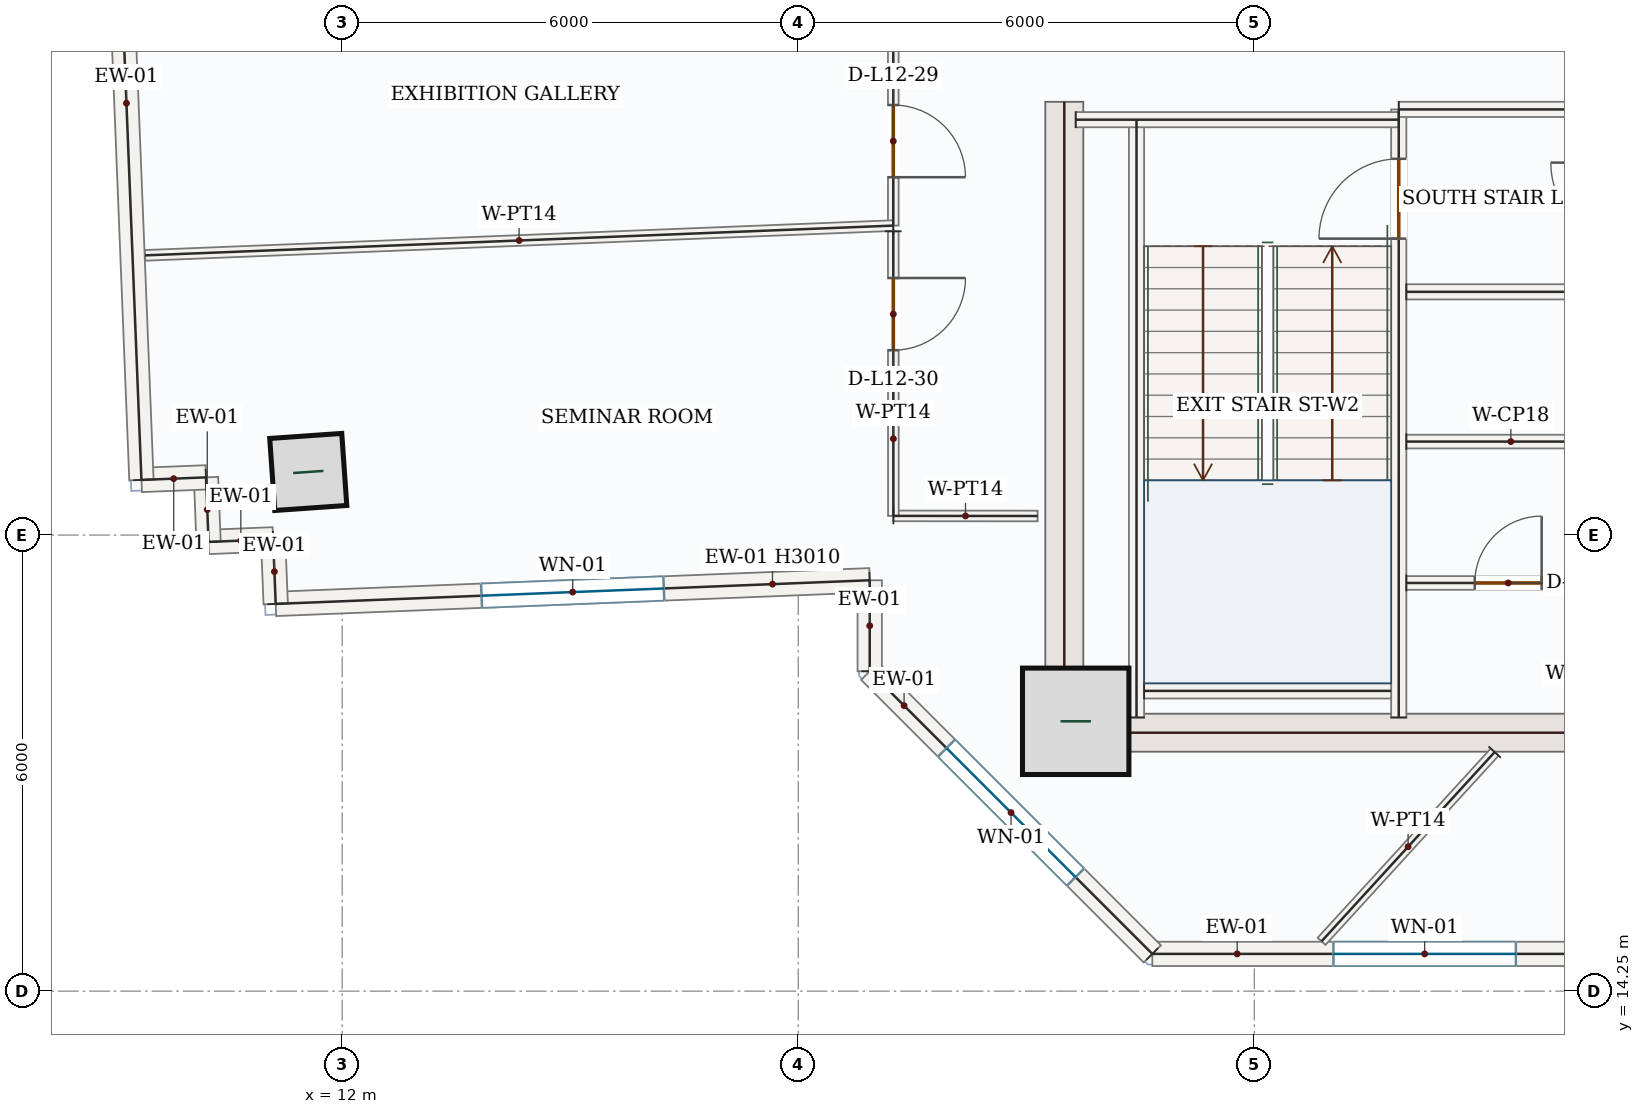
"""IFC4 building model, lengths in metres.
Left out: names, types, materials, properties, quantities, classifications, styles, units other than length and angle.
Written with IfcOpenShell. Run it as: python <this file> out.ifc"""

import sys

from ifc_helpers import new_model, si_unit, direction, frame, frame_2d, origin, origin_2d, place, context, subcontext, project, spatial, rectangle, hollow_rectangle, extrude, source, transform, mapped, element, fill, save


model = new_model("IFC4")
c1 = context("Model", 3, precision=1e-05, world=origin(), true_north=direction((0.0, 1.0)))
c2 = subcontext(c1, "Body", "Model", "MODEL_VIEW")
j1 = project(units=[si_unit("LENGTHUNIT", "METRE"), si_unit("PLANEANGLEUNIT", "RADIAN")], contexts=[c1])
p1 = place(None, origin())
s1 = spatial("IfcSite", under=j1, at=p1, CompositionType="ELEMENT")
p2 = place(p1, origin())
s2 = spatial("IfcBuilding", under=s1, at=p2, CompositionType="ELEMENT")
p3 = place(p2, frame((0.0, 0.0, 58.5)))
s3 = spatial("IfcBuildingStorey", under=s2, at=p3, CompositionType="ELEMENT", Elevation=58.5)
m1 = source(origin(), c2, "Body", "SweptSolid", [
    extrude(rectangle(XDim=8.55, YDim=0.5, at=frame_2d((4.275, 0.0))), origin(), (0.0, 0.0, 1.0), 3.95),
])
p4 = place(p3, frame((21.5, 17.4, 0.0), z_axis=(0.0, 0.0, 1.0), x_axis=(0.0, 1.0, 0.0)))
e1 = element("IfcWall", 1, at=p4, inside=s3, PredefinedType="SHEAR", context=c2, shape_type="MappedRepresentation", body=[
    mapped(m1, transform((0.0, 0.0, 0.0), x_axis=(1.0, 0.0, 0.0), y_axis=(0.0, 1.0, 0.0), z_axis=(0.0, 0.0, 1.0), scale=1.0)),
])
m2 = source(origin(), c2, "Body", "SweptSolid", [
    extrude(rectangle(XDim=7.0, YDim=0.5, at=frame_2d((3.5, 0.0))), origin(), (0.0, 0.0, 1.0), 3.95),
])
p5 = place(p3, frame((21.75, 17.65, 0.0), z_axis=(0.0, 0.0, 1.0), x_axis=(1.0, 0.0, 0.0)))
e2 = element("IfcWall", 2, at=p5, inside=s3, PredefinedType="SHEAR", context=c2, shape_type="MappedRepresentation", body=[
    mapped(m2, transform((0.0, 0.0, 0.0), x_axis=(1.0, 0.0, 0.0), y_axis=(0.0, 1.0, 0.0), z_axis=(0.0, 0.0, 1.0), scale=1.0)),
])
m3 = source(origin(), c2, "Body", "SweptSolid", [
    extrude(rectangle(XDim=1.4, YDim=1.4, at=origin_2d()), origin(), (0.0, 0.0, 1.0), 4.2),
])
p6 = place(p3, frame((21.65, 17.8, 0.0), z_axis=(0.0, 0.0, 1.0), x_axis=(1.0, 0.0, 0.0)))
e3 = element("IfcColumn", 3, at=p6, inside=s3, PredefinedType="COLUMN", context=c2, shape_type="MappedRepresentation", body=[
    mapped(m3, transform((0.0, 0.0, 0.0), x_axis=(1.0, 0.0, 0.0), y_axis=(0.0, 1.0, 0.0), z_axis=(0.0, 0.0, 1.0), scale=1.0)),
])
m4 = source(origin(), c2, "Body", "SweptSolid", [
    extrude(hollow_rectangle(XDim=0.95, YDim=0.95, WallThickness=0.05, at=origin_2d()), origin(), (0.0, 0.0, 1.0), 4.2),
])
p7 = place(p3, frame((11.553, 21.08, 0.0), z_axis=(0.0, 0.0, 1.0), x_axis=(0.99756405026, 0.069756473744, 0.0)))
e4 = element("IfcColumn", 4, at=p7, inside=s3, PredefinedType="COLUMN", context=c2, shape_type="MappedRepresentation", body=[
    mapped(m4, transform((0.0, 0.0, 0.0), x_axis=(1.0, 0.0, 0.0), y_axis=(0.0, 1.0, 0.0), z_axis=(0.0, 0.0, 1.0), scale=1.0)),
])
p8 = place(p3, frame((29.823, 14.74, 0.0), z_axis=(0.0, 0.0, 1.0), x_axis=(-1.0, 0.0, 0.0)))
e5 = element("IfcWall", 5, at=p8, inside=s3, PredefinedType="SOLIDWALL", context=c2, shape_type="SweptSolid", body=[
    extrude(rectangle(XDim=7.165, YDim=0.32, at=frame_2d((3.583, 0.0))), origin(), (0.0, 0.0, 1.0), 3.95),
])
p9 = place(p8, frame((2.382, 0.0, 0.85)))
e6 = element("IfcOpeningElement", 6, at=p9, cuts=e5, PredefinedType="OPENING", context=c2, shape_type="SweptSolid", body=[
    extrude(rectangle(XDim=2.4, YDim=1.8, at=frame_2d((1.2, 0.9))), frame((0.0, 0.17, 0.0), z_axis=(0.0, -1.0, 0.0), x_axis=(1.0, 0.0, 0.0)), (0.0, 0.0, 1.0), 0.34),
])
p10 = place(p3, frame((22.658, 14.74, 0.0), z_axis=(0.0, 0.0, 1.0), x_axis=(-0.707106781187, 0.707106781187, 0.0)))
e7 = element("IfcWall", 7, at=p10, inside=s3, PredefinedType="SOLIDWALL", context=c2, shape_type="SweptSolid", body=[
    extrude(rectangle(XDim=5.258, YDim=0.32, at=frame_2d((2.629, 0.0))), origin(), (0.0, 0.0, 1.0), 3.95),
])
p11 = place(p10, frame((1.429, 0.0, 0.85)))
e8 = element("IfcOpeningElement", 8, at=p11, cuts=e7, PredefinedType="OPENING", context=c2, shape_type="SweptSolid", body=[
    extrude(rectangle(XDim=2.4, YDim=1.8, at=frame_2d((1.2, 0.9))), frame((0.0, 0.17, 0.0), z_axis=(0.0, -1.0, 0.0), x_axis=(1.0, 0.0, 0.0)), (0.0, 0.0, 1.0), 0.34),
])
m5 = source(origin(), c2, "Body", "SweptSolid", [
    extrude(rectangle(XDim=1.198, YDim=0.32, at=frame_2d((0.599, 0.0))), origin(), (0.0, 0.0, 1.0), 3.95),
])
p12 = place(p3, frame((18.94, 18.458, 0.0), z_axis=(0.0, 0.0, 1.0), x_axis=(0.0, 1.0, 0.0)))
e9 = element("IfcWall", 9, at=p12, inside=s3, PredefinedType="SOLIDWALL", context=c2, shape_type="MappedRepresentation", body=[
    mapped(m5, transform((0.0, 0.0, 0.0), x_axis=(1.0, 0.0, 0.0), y_axis=(0.0, 1.0, 0.0), z_axis=(0.0, 0.0, 1.0), scale=1.0)),
])
p13 = place(p3, frame((18.94, 19.656, 0.0), z_axis=(0.0, 0.0, 1.0), x_axis=(-0.999208917222, -0.039768577336, 0.0)))
e10 = element("IfcWall", 10, at=p13, inside=s3, PredefinedType="SOLIDWALL", context=c2, shape_type="SweptSolid", body=[
    extrude(rectangle(XDim=7.821, YDim=0.32, at=frame_2d((3.911, 0.0))), origin(), (0.0, 0.0, 1.0), 3.01),
])
p14 = place(p13, frame((2.711, 0.0, 0.85)))
e11 = element("IfcOpeningElement", 11, at=p14, cuts=e10, PredefinedType="OPENING", context=c2, shape_type="SweptSolid", body=[
    extrude(rectangle(XDim=2.4, YDim=1.8, at=frame_2d((1.2, 0.9))), frame((0.0, 0.17, 0.0), z_axis=(0.0, -1.0, 0.0), x_axis=(1.0, 0.0, 0.0)), (0.0, 0.0, 1.0), 0.34),
])
m6 = source(origin(), c2, "Body", "SweptSolid", [
    extrude(rectangle(XDim=0.85, YDim=0.32, at=frame_2d((0.425, 0.0))), origin(), (0.0, 0.0, 1.0), 3.95),
])
p15 = place(p3, frame((11.125, 19.344, 0.0), z_axis=(0.0, 0.0, 1.0), x_axis=(-0.039933618331, 0.999202334929, 0.0)))
e12 = element("IfcWall", 12, at=p15, inside=s3, PredefinedType="SOLIDWALL", context=c2, shape_type="MappedRepresentation", body=[
    mapped(m6, transform((0.0, 0.0, 0.0), x_axis=(1.0, 0.0, 0.0), y_axis=(0.0, 1.0, 0.0), z_axis=(0.0, 0.0, 1.0), scale=1.0)),
])
m7 = source(origin(), c2, "Body", "SweptSolid", [
    extrude(rectangle(XDim=0.85, YDim=0.32, at=frame_2d((0.425, 0.0))), origin(), (0.0, 0.0, 1.0), 3.95),
])
for number, where, z_axis, x_axis in (
    (13, (11.091, 20.194, 0.0), (0.0, 0.0, 1.0), (-0.999, -0.04, 0.0)),
    (14, (10.242, 20.16, 0.0), (0.0, 0.0, 1.0), (-0.04, 0.999, 0.0)),
    (15, (10.208, 21.009, 0.0), (0.0, 0.0, 1.0), (-0.999, -0.04, 0.0)),
):
    element("IfcWall", number, at=place(p3, frame(where, z_axis=z_axis, x_axis=x_axis)), inside=s3, PredefinedType="SOLIDWALL", context=c2, shape_type="MappedRepresentation", body=[
        mapped(m7, transform((0.0, 0.0, 0.0), x_axis=(1.0, 0.0, 0.0), y_axis=(0.0, 1.0, 0.0), z_axis=(0.0, 0.0, 1.0), scale=1.0)),
    ])
m8 = source(origin(), c2, "Body", "SweptSolid", [
    extrude(rectangle(XDim=9.92, YDim=0.32, at=frame_2d((4.96, 0.0))), origin(), (0.0, 0.0, 1.0), 3.95),
])
p16 = place(p3, frame((9.359, 20.975, 0.0), z_axis=(0.0, 0.0, 1.0), x_axis=(-0.03977146366, 0.999208802342, 0.0)))
e16 = element("IfcWall", 16, at=p16, inside=s3, PredefinedType="SOLIDWALL", context=c2, shape_type="MappedRepresentation", body=[
    mapped(m8, transform((0.0, 0.0, 0.0), x_axis=(1.0, 0.0, 0.0), y_axis=(0.0, 1.0, 0.0), z_axis=(0.0, 0.0, 1.0), scale=1.0)),
])
m9 = source(origin(), c2, "Body", "SweptSolid", [
    extrude(rectangle(XDim=7.87, YDim=0.2, at=frame_2d((3.935, 0.0))), origin(), (0.0, 0.0, 1.0), 3.95),
])
p17 = place(p3, frame((22.45, 17.85, 0.0), z_axis=(0.0, 0.0, 1.0), x_axis=(0.0, 1.0, 0.0)))
e17 = element("IfcWall", 17, at=p17, inside=s3, PredefinedType="SOLIDWALL", context=c2, shape_type="MappedRepresentation", body=[
    mapped(m9, transform((0.0, 0.0, 0.0), x_axis=(1.0, 0.0, 0.0), y_axis=(0.0, 1.0, 0.0), z_axis=(0.0, 0.0, 1.0), scale=1.0)),
])
p18 = place(p3, frame((25.9, 17.85, 0.0), z_axis=(0.0, 0.0, 1.0), x_axis=(0.0, 1.0, 0.0)))
e18 = element("IfcWall", 18, at=p18, inside=s3, PredefinedType="SOLIDWALL", context=c2, shape_type="SweptSolid", body=[
    extrude(rectangle(XDim=8.0, YDim=0.2, at=frame_2d((4.0, 0.0))), origin(), (0.0, 0.0, 1.0), 3.95),
])
p19 = place(p18, frame((6.3, 0.0, 0.0)))
e19 = element("IfcOpeningElement", 19, at=p19, cuts=e18, PredefinedType="OPENING", context=c2, shape_type="SweptSolid", body=[
    extrude(rectangle(XDim=1.05, YDim=2.15, at=frame_2d((0.525, 1.075))), frame((0.0, 0.11, 0.0), z_axis=(0.0, -1.0, 0.0), x_axis=(1.0, 0.0, 0.0)), (0.0, 0.0, 1.0), 0.22),
])
m10 = source(origin(), c2, "Body", "SweptSolid", [
    extrude(rectangle(XDim=4.25, YDim=0.2, at=frame_2d((2.125, 0.0))), origin(), (0.0, 0.0, 1.0), 3.95),
])
p20 = place(p3, frame((21.65, 25.715, 0.0), z_axis=(0.0, 0.0, 1.0), x_axis=(1.0, 0.0, 0.0)))
e20 = element("IfcWall", 20, at=p20, inside=s3, PredefinedType="SOLIDWALL", context=c2, shape_type="MappedRepresentation", body=[
    mapped(m10, transform((0.0, 0.0, 0.0), x_axis=(1.0, 0.0, 0.0), y_axis=(0.0, 1.0, 0.0), z_axis=(0.0, 0.0, 1.0), scale=1.0)),
])
m11 = source(origin(), c2, "Body", "SweptSolid", [
    extrude(rectangle(XDim=3.0, YDim=0.2, at=frame_2d((1.5, 0.0))), origin(), (0.0, 0.0, 1.0), 3.95),
])
p21 = place(p3, frame((25.9, 25.85, 0.0), z_axis=(0.0, 0.0, 1.0), x_axis=(1.0, 0.0, 0.0)))
e21 = element("IfcWall", 21, at=p21, inside=s3, PredefinedType="SOLIDWALL", context=c2, shape_type="MappedRepresentation", body=[
    mapped(m11, transform((0.0, 0.0, 0.0), x_axis=(1.0, 0.0, 0.0), y_axis=(0.0, 1.0, 0.0), z_axis=(0.0, 0.0, 1.0), scale=1.0)),
])
m12 = source(origin(), c2, "Body", "SweptSolid", [
    extrude(rectangle(XDim=3.25, YDim=0.2, at=frame_2d((1.625, 0.0))), origin(), (0.0, 0.0, 1.0), 3.95),
])
p22 = place(p3, frame((22.55, 18.2, 0.0), z_axis=(0.0, 0.0, 1.0), x_axis=(1.0, 0.0, 0.0)))
e22 = element("IfcWall", 22, at=p22, inside=s3, PredefinedType="SOLIDWALL", context=c2, shape_type="MappedRepresentation", body=[
    mapped(m12, transform((0.0, 0.0, 0.0), x_axis=(1.0, 0.0, 0.0), y_axis=(0.0, 1.0, 0.0), z_axis=(0.0, 0.0, 1.0), scale=1.0)),
])
m13 = source(origin(), c2, "Body", "SweptSolid", [
    extrude(rectangle(XDim=2.75, YDim=0.2, at=frame_2d((1.375, 0.0))), origin(), (0.0, 0.0, 1.0), 3.95),
])
p23 = place(p3, frame((26.0, 23.45, 0.0), z_axis=(0.0, 0.0, 1.0), x_axis=(1.0, 0.0, 0.0)))
e23 = element("IfcWall", 23, at=p23, inside=s3, PredefinedType="SOLIDWALL", context=c2, shape_type="MappedRepresentation", body=[
    mapped(m13, transform((0.0, 0.0, 0.0), x_axis=(1.0, 0.0, 0.0), y_axis=(0.0, 1.0, 0.0), z_axis=(0.0, 0.0, 1.0), scale=1.0)),
])
p24 = place(p3, frame((26.0, 19.62, 0.0), z_axis=(0.0, 0.0, 1.0), x_axis=(1.0, 0.0, 0.0)))
e24 = element("IfcWall", 24, at=p24, inside=s3, PredefinedType="PARTITIONING", context=c2, shape_type="SweptSolid", body=[
    extrude(rectangle(XDim=2.75, YDim=0.18, at=frame_2d((1.375, 0.0))), origin(), (0.0, 0.0, 1.0), 3.95),
])
p25 = place(p24, frame((0.9, 0.0, 0.0)))
e25 = element("IfcOpeningElement", 25, at=p25, cuts=e24, PredefinedType="OPENING", context=c2, shape_type="SweptSolid", body=[
    extrude(rectangle(XDim=0.88, YDim=2.1, at=frame_2d((0.44, 1.05))), frame((0.0, 0.1, 0.0), z_axis=(0.0, -1.0, 0.0), x_axis=(1.0, 0.0, 0.0)), (0.0, 0.0, 1.0), 0.2),
])
m14 = source(origin(), c2, "Body", "SweptSolid", [
    extrude(rectangle(XDim=2.75, YDim=0.18, at=frame_2d((1.375, 0.0))), origin(), (0.0, 0.0, 1.0), 3.95),
])
p26 = place(p3, frame((26.0, 21.48, 0.0), z_axis=(0.0, 0.0, 1.0), x_axis=(1.0, 0.0, 0.0)))
e26 = element("IfcWall", 26, at=p26, inside=s3, PredefinedType="PARTITIONING", context=c2, shape_type="MappedRepresentation", body=[
    mapped(m14, transform((0.0, 0.0, 0.0), x_axis=(1.0, 0.0, 0.0), y_axis=(0.0, 1.0, 0.0), z_axis=(0.0, 0.0, 1.0), scale=1.0)),
])
p27 = place(p3, frame((19.25, 28.165, 0.0), z_axis=(0.0, 0.0, 1.0), x_axis=(0.0, -1.0, 0.0)))
e27 = element("IfcWall", 27, at=p27, inside=s3, PredefinedType="PARTITIONING", context=c2, shape_type="SweptSolid", body=[
    extrude(rectangle(XDim=3.843, YDim=0.14, at=frame_2d((1.921, 0.0))), origin(), (0.0, 0.0, 1.0), 3.95),
])
p28 = place(p27, frame((2.257, 0.0, 0.0)))
e28 = element("IfcOpeningElement", 28, at=p28, cuts=e27, PredefinedType="OPENING", context=c2, shape_type="SweptSolid", body=[
    extrude(rectangle(XDim=0.95, YDim=2.15, at=frame_2d((0.475, 1.075))), frame((0.0, 0.08, 0.0), z_axis=(0.0, -1.0, 0.0), x_axis=(1.0, 0.0, 0.0)), (0.0, 0.0, 1.0), 0.16),
])
m15 = source(origin(), c2, "Body", "SweptSolid", [
    extrude(rectangle(XDim=9.851, YDim=0.14, at=frame_2d((4.925, 0.0))), origin(), (0.0, 0.0, 1.0), 3.95),
])
p29 = place(p3, frame((19.249, 24.322, 0.0), z_axis=(0.0, 0.0, 1.0), x_axis=(-0.999208542072, -0.039778002084, 0.0)))
e29 = element("IfcWall", 29, at=p29, inside=s3, PredefinedType="PARTITIONING", context=c2, shape_type="MappedRepresentation", body=[
    mapped(m15, transform((0.0, 0.0, 0.0), x_axis=(1.0, 0.0, 0.0), y_axis=(0.0, 1.0, 0.0), z_axis=(0.0, 0.0, 1.0), scale=1.0)),
])
m16 = source(origin(), c2, "Body", "SweptSolid", [
    extrude(rectangle(XDim=1.898, YDim=0.14, at=frame_2d((0.949, 0.0))), origin(), (0.0, 0.0, 1.0), 3.95),
])
p30 = place(p3, frame((19.251, 20.502, 0.0), z_axis=(0.0, 0.0, 1.0), x_axis=(0.999999793113, -0.00064325215, 0.0)))
e30 = element("IfcWall", 30, at=p30, inside=s3, PredefinedType="PARTITIONING", context=c2, shape_type="MappedRepresentation", body=[
    mapped(m16, transform((0.0, 0.0, 0.0), x_axis=(1.0, 0.0, 0.0), y_axis=(0.0, 1.0, 0.0), z_axis=(0.0, 0.0, 1.0), scale=1.0)),
])
m17 = source(origin(), c2, "Body", "SweptSolid", [
    extrude(rectangle(XDim=3.375, YDim=0.14, at=frame_2d((1.688, 0.0))), origin(), (0.0, 0.0, 1.0), 3.95),
])
p31 = place(p3, frame((27.162, 17.395, 0.0), z_axis=(0.0, 0.0, 1.0), x_axis=(-0.674974079893, -0.737841440604, 0.0)))
e31 = element("IfcWall", 31, at=p31, inside=s3, PredefinedType="PARTITIONING", context=c2, shape_type="MappedRepresentation", body=[
    mapped(m17, transform((0.0, 0.0, 0.0), x_axis=(1.0, 0.0, 0.0), y_axis=(0.0, 1.0, 0.0), z_axis=(0.0, 0.0, 1.0), scale=1.0)),
])
p32 = place(p3, frame((19.25, 24.247, 0.0), z_axis=(0.0, 0.0, 1.0), x_axis=(0.000326008981, -0.999999946859, 0.0)))
e32 = element("IfcWall", 32, at=p32, inside=s3, PredefinedType="PARTITIONING", context=c2, shape_type="SweptSolid", body=[
    extrude(rectangle(XDim=3.744, YDim=0.14, at=frame_2d((1.872, 0.0))), origin(), (0.0, 0.0, 1.0), 3.95),
])
p33 = place(p32, frame((0.615, 0.0, 0.0)))
e33 = element("IfcOpeningElement", 33, at=p33, cuts=e32, PredefinedType="OPENING", context=c2, shape_type="SweptSolid", body=[
    extrude(rectangle(XDim=0.95, YDim=2.15, at=frame_2d((0.475, 1.075))), frame((0.0, 0.08, 0.0), z_axis=(0.0, -1.0, 0.0), x_axis=(1.0, 0.0, 0.0)), (0.0, 0.0, 1.0), 0.16),
])
m18 = source(origin(), c2, "Body", "SweptSolid", [
    extrude(rectangle(XDim=2.4, YDim=1.8, at=frame_2d((1.2, 0.9))), frame((0.0, 0.03, 0.0), z_axis=(0.0, -1.0, 0.0), x_axis=(1.0, 0.0, 0.0)), (0.0, 0.0, 1.0), 0.06),
])
p34 = place(p9, origin())
e34 = element("IfcWindow", 34, at=p34, inside=s3, PartitioningType="DOUBLE_PANEL_VERTICAL", PredefinedType="WINDOW", context=c2, shape_type="MappedRepresentation", body=[
    mapped(m18, transform((0.0, 0.0, 0.0), x_axis=(1.0, 0.0, 0.0), y_axis=(0.0, 1.0, 0.0), z_axis=(0.0, 0.0, 1.0), scale=1.0)),
])
fill(e6, e34)
p35 = place(p11, origin())
e35 = element("IfcWindow", 35, at=p35, inside=s3, PartitioningType="DOUBLE_PANEL_VERTICAL", PredefinedType="WINDOW", context=c2, shape_type="MappedRepresentation", body=[
    mapped(m18, transform((0.0, 0.0, 0.0), x_axis=(1.0, 0.0, 0.0), y_axis=(0.0, 1.0, 0.0), z_axis=(0.0, 0.0, 1.0), scale=1.0)),
])
fill(e8, e35)
p36 = place(p14, origin())
e36 = element("IfcWindow", 36, at=p36, inside=s3, PartitioningType="DOUBLE_PANEL_VERTICAL", PredefinedType="WINDOW", context=c2, shape_type="MappedRepresentation", body=[
    mapped(m18, transform((0.0, 0.0, 0.0), x_axis=(1.0, 0.0, 0.0), y_axis=(0.0, 1.0, 0.0), z_axis=(0.0, 0.0, 1.0), scale=1.0)),
])
fill(e11, e36)
m19 = source(origin(), c2, "Body", "SweptSolid", [
    extrude(rectangle(XDim=1.05, YDim=2.15, at=frame_2d((0.525, 1.075))), frame((0.0, 0.025, 0.0), z_axis=(0.0, -1.0, 0.0), x_axis=(1.0, 0.0, 0.0)), (0.0, 0.0, 1.0), 0.05),
])
p37 = place(p19, origin())
e37 = element("IfcDoor", 37, at=p37, inside=s3, OperationType="SINGLE_SWING_LEFT", PredefinedType="DOOR", context=c2, shape_type="MappedRepresentation", body=[
    mapped(m19, transform((0.0, 0.0, 0.0), x_axis=(1.0, 0.0, 0.0), y_axis=(0.0, 1.0, 0.0), z_axis=(0.0, 0.0, 1.0), scale=1.0)),
])
fill(e19, e37)
m20 = source(origin(), c2, "Body", "SweptSolid", [
    extrude(rectangle(XDim=0.88, YDim=2.1, at=frame_2d((0.44, 1.05))), frame((0.0, 0.025, 0.0), z_axis=(0.0, -1.0, 0.0), x_axis=(1.0, 0.0, 0.0)), (0.0, 0.0, 1.0), 0.05),
])
p38 = place(p25, origin())
e38 = element("IfcDoor", 38, at=p38, inside=s3, OperationType="SINGLE_SWING_RIGHT", PredefinedType="DOOR", context=c2, shape_type="MappedRepresentation", body=[
    mapped(m20, transform((0.0, 0.0, 0.0), x_axis=(1.0, 0.0, 0.0), y_axis=(0.0, 1.0, 0.0), z_axis=(0.0, 0.0, 1.0), scale=1.0)),
])
fill(e25, e38)
m21 = source(origin(), c2, "Body", "SweptSolid", [
    extrude(rectangle(XDim=0.95, YDim=2.15, at=frame_2d((0.475, 1.075))), frame((0.0, 0.025, 0.0), z_axis=(0.0, -1.0, 0.0), x_axis=(1.0, 0.0, 0.0)), (0.0, 0.0, 1.0), 0.05),
])
p39 = place(p28, origin())
e39 = element("IfcDoor", 39, at=p39, inside=s3, OperationType="SINGLE_SWING_RIGHT", PredefinedType="DOOR", context=c2, shape_type="MappedRepresentation", body=[
    mapped(m21, transform((0.0, 0.0, 0.0), x_axis=(1.0, 0.0, 0.0), y_axis=(0.0, 1.0, 0.0), z_axis=(0.0, 0.0, 1.0), scale=1.0)),
])
fill(e28, e39)
p40 = place(p33, origin())
e40 = element("IfcDoor", 40, at=p40, inside=s3, OperationType="SINGLE_SWING_LEFT", PredefinedType="DOOR", context=c2, shape_type="MappedRepresentation", body=[
    mapped(m21, transform((0.0, 0.0, 0.0), x_axis=(1.0, 0.0, 0.0), y_axis=(0.0, 1.0, 0.0), z_axis=(0.0, 0.0, 1.0), scale=1.0)),
])
fill(e33, e40)
save(model, sys.argv[1])
